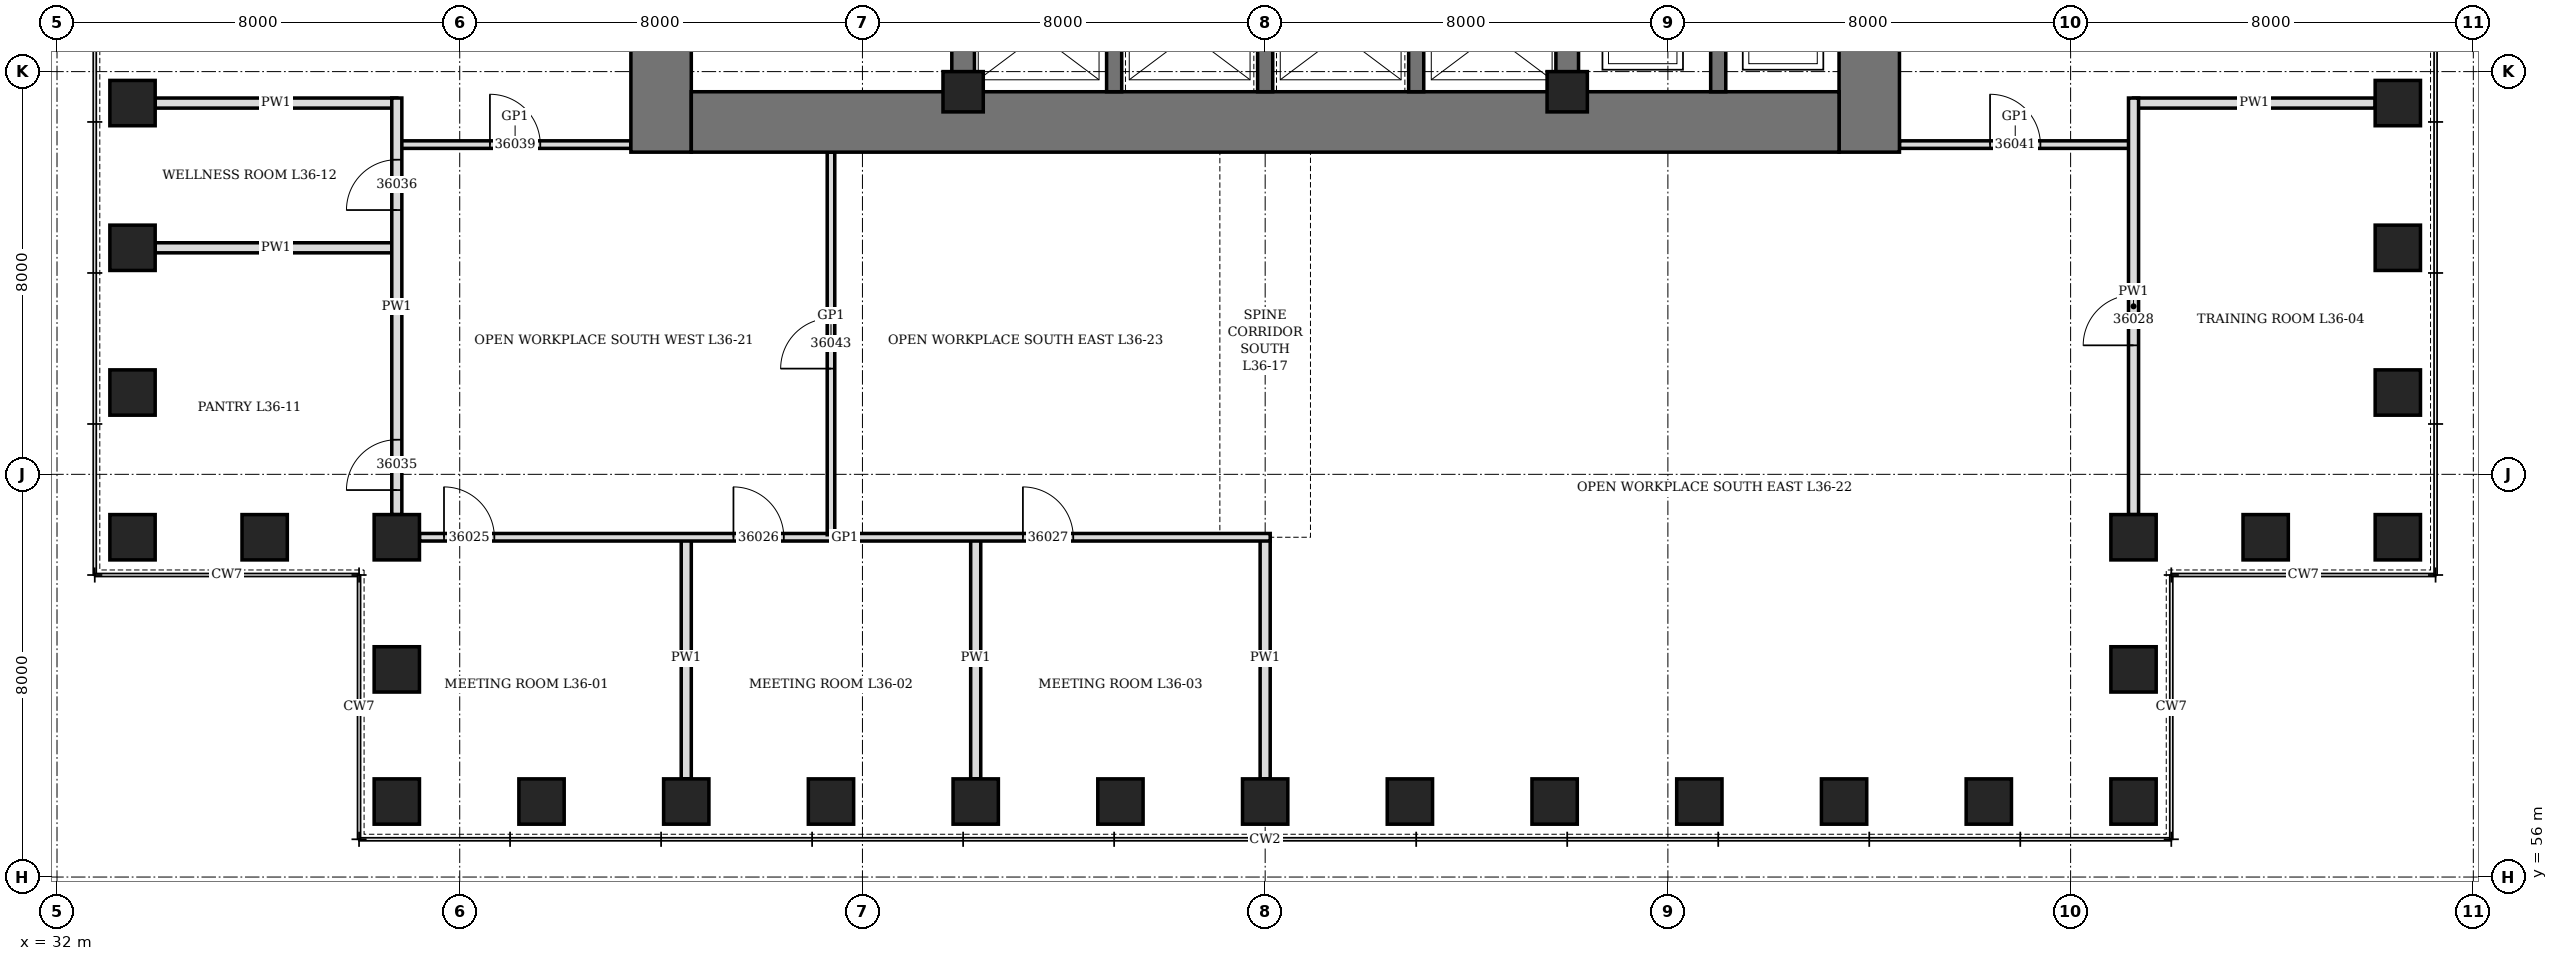
"""IFC4 building model, lengths in metres.
Left out: names, types, materials, properties, quantities, classifications, styles, units other than length and angle.
Written with IfcOpenShell. Run it as: python <this file> out.ifc"""

import sys

from ifc_helpers import new_model, si_unit, direction, frame, frame_2d, origin, origin_2d, place, context, subcontext, project, spatial, rectangle, hollow_rectangle, extrude, element, fill, save


model = new_model("IFC4")
c1 = context("Model", 3, precision=1e-05, world=origin(), true_north=direction((0.0, 1.0)))
c2 = subcontext(c1, "Body", "Model", "MODEL_VIEW")
j1 = project(units=[si_unit("LENGTHUNIT", "METRE"), si_unit("PLANEANGLEUNIT", "RADIAN")], contexts=[c1])
p1 = place(None, origin())
s1 = spatial("IfcSite", under=j1, at=p1, CompositionType="ELEMENT")
p2 = place(p1, origin())
s2 = spatial("IfcBuilding", under=s1, at=p2, CompositionType="ELEMENT")
p3 = place(p2, frame((0.0, 0.0, 162.7)))
s3 = spatial("IfcBuildingStorey", under=s2, at=p3, CompositionType="ELEMENT", Elevation=162.7)
for number, where, z_axis, x_axis in (
    (1, (38.75, 57.5, 0.0), (0.0, 0.0, 1.0), (1.0, 0.0, 0.0)),
    (2, (41.625, 57.5, 0.0), (0.0, 0.0, 1.0), (1.0, 0.0, 0.0)),
    (3, (44.5, 57.5, 0.0), (0.0, 0.0, 1.0), (1.0, 0.0, 0.0)),
    (4, (47.375, 57.5, 0.0), (0.0, 0.0, 1.0), (1.0, 0.0, 0.0)),
    (5, (50.25, 57.5, 0.0), (0.0, 0.0, 1.0), (1.0, 0.0, 0.0)),
    (6, (53.125, 57.5, 0.0), (0.0, 0.0, 1.0), (1.0, 0.0, 0.0)),
    (7, (56.0, 57.5, 0.0), (0.0, 0.0, 1.0), (1.0, 0.0, 0.0)),
    (8, (58.875, 57.5, 0.0), (0.0, 0.0, 1.0), (1.0, 0.0, 0.0)),
    (9, (61.75, 57.5, 0.0), (0.0, 0.0, 1.0), (1.0, 0.0, 0.0)),
    (10, (64.625, 57.5, 0.0), (0.0, 0.0, 1.0), (1.0, 0.0, 0.0)),
    (11, (67.5, 57.5, 0.0), (0.0, 0.0, 1.0), (1.0, 0.0, 0.0)),
    (12, (70.375, 57.5, 0.0), (0.0, 0.0, 1.0), (1.0, 0.0, 0.0)),
    (13, (73.25, 57.5, 0.0), (0.0, 0.0, 1.0), (0.0, 1.0, 0.0)),
    (14, (73.25, 60.125, 0.0), (0.0, 0.0, 1.0), (0.0, 1.0, 0.0)),
    (15, (73.25, 62.75, 0.0), (0.0, 0.0, 1.0), (1.0, 0.0, 0.0)),
    (16, (75.875, 62.75, 0.0), (0.0, 0.0, 1.0), (1.0, 0.0, 0.0)),
    (17, (78.5, 62.75, 0.0), (0.0, 0.0, 1.0), (0.0, 1.0, 0.0)),
    (18, (78.5, 65.625, 0.0), (0.0, 0.0, 1.0), (0.0, 1.0, 0.0)),
    (19, (78.5, 68.5, 0.0), (0.0, 0.0, 1.0), (0.0, 1.0, 0.0)),
    (20, (78.5, 71.375, 0.0), (0.0, 0.0, 1.0), (0.0, 1.0, 0.0)),
    (21, (33.5, 71.375, 0.0), (0.0, 0.0, 1.0), (0.0, 1.0, 0.0)),
    (22, (33.5, 68.5, 0.0), (0.0, 0.0, 1.0), (0.0, 1.0, 0.0)),
    (23, (33.5, 65.625, 0.0), (0.0, 0.0, 1.0), (0.0, 1.0, 0.0)),
    (24, (33.5, 62.75, 0.0), (0.0, 0.0, 1.0), (1.0, 0.0, 0.0)),
    (25, (36.125, 62.75, 0.0), (0.0, 0.0, 1.0), (1.0, 0.0, 0.0)),
    (26, (38.75, 62.75, 0.0), (0.0, 0.0, 1.0), (0.0, 1.0, 0.0)),
    (27, (38.75, 60.125, 0.0), (0.0, 0.0, 1.0), (0.0, 1.0, 0.0)),
):
    element("IfcColumn", number, at=place(p3, frame(where, z_axis=z_axis, x_axis=x_axis)), inside=s3, PredefinedType="COLUMN", context=c2, shape_type="SweptSolid", body=[
        extrude(hollow_rectangle(XDim=0.9, YDim=0.9, WallThickness=0.12, at=origin_2d()), origin(), (0.0, 0.0, 1.0), 4.2),
    ])
p4 = place(p3, frame((44.0, 70.4, 0.0), z_axis=(0.0, 0.0, 1.0), x_axis=(0.0, 1.0, 0.0)))
e28 = element("IfcWall", 28, at=p4, inside=s3, PredefinedType="SHEAR", context=c2, shape_type="SweptSolid", body=[
    extrude(rectangle(XDim=19.2, YDim=1.2, at=frame_2d((9.6, 0.0))), origin(), (0.0, 0.0, 1.0), 4.2),
])
p5 = place(p4, frame((8.6, 0.0, 0.0)))
e29 = element("IfcOpeningElement", 29, at=p5, cuts=e28, PredefinedType="OPENING", context=c2, shape_type="SweptSolid", body=[
    extrude(rectangle(XDim=2.0, YDim=2.4, at=frame_2d((1.0, 1.2))), frame((0.0, 0.61, 0.0), z_axis=(0.0, -1.0, 0.0), x_axis=(1.0, 0.0, 0.0)), (0.0, 0.0, 1.0), 1.22),
])
p6 = place(p3, frame((68.0, 70.4, 0.0), z_axis=(0.0, 0.0, 1.0), x_axis=(0.0, 1.0, 0.0)))
e30 = element("IfcWall", 30, at=p6, inside=s3, PredefinedType="SHEAR", context=c2, shape_type="SweptSolid", body=[
    extrude(rectangle(XDim=19.2, YDim=1.2, at=frame_2d((9.6, 0.0))), origin(), (0.0, 0.0, 1.0), 4.2),
])
p7 = place(p6, frame((8.6, 0.0, 0.0)))
e31 = element("IfcOpeningElement", 31, at=p7, cuts=e30, PredefinedType="OPENING", context=c2, shape_type="SweptSolid", body=[
    extrude(rectangle(XDim=2.0, YDim=2.4, at=frame_2d((1.0, 1.2))), frame((0.0, 0.61, 0.0), z_axis=(0.0, -1.0, 0.0), x_axis=(1.0, 0.0, 0.0)), (0.0, 0.0, 1.0), 1.22),
])
p8 = place(p3, frame((44.6, 71.0, 0.0), z_axis=(0.0, 0.0, 1.0), x_axis=(1.0, 0.0, 0.0)))
e32 = element("IfcWall", 32, at=p8, inside=s3, PredefinedType="SHEAR", context=c2, shape_type="SweptSolid", body=[
    extrude(rectangle(XDim=22.8, YDim=1.2, at=frame_2d((11.4, 0.0))), origin(), (0.0, 0.0, 1.0), 4.2),
])
p9 = place(p3, frame((50.0, 71.6, 0.0), z_axis=(0.0, 0.0, 1.0), x_axis=(0.0, 1.0, 0.0)))
e33 = element("IfcWall", 33, at=p9, inside=s3, PredefinedType="SHEAR", context=c2, shape_type="SweptSolid", body=[
    extrude(rectangle(XDim=16.8, YDim=0.45, at=frame_2d((8.4, 0.0))), origin(), (0.0, 0.0, 1.0), 4.2),
])
p10 = place(p9, frame((7.5, 0.0, 0.0)))
e34 = element("IfcOpeningElement", 34, at=p10, cuts=e33, PredefinedType="OPENING", context=c2, shape_type="SweptSolid", body=[
    extrude(rectangle(XDim=1.8, YDim=2.4, at=frame_2d((0.9, 1.2))), frame((0.0, 0.235, 0.0), z_axis=(0.0, -1.0, 0.0), x_axis=(1.0, 0.0, 0.0)), (0.0, 0.0, 1.0), 0.47),
])
p11 = place(p3, frame((62.0, 71.6, 0.0), z_axis=(0.0, 0.0, 1.0), x_axis=(0.0, 1.0, 0.0)))
e35 = element("IfcWall", 35, at=p11, inside=s3, PredefinedType="SHEAR", context=c2, shape_type="SweptSolid", body=[
    extrude(rectangle(XDim=16.8, YDim=0.45, at=frame_2d((8.4, 0.0))), origin(), (0.0, 0.0, 1.0), 4.2),
])
p12 = place(p11, frame((7.5, 0.0, 0.0)))
e36 = element("IfcOpeningElement", 36, at=p12, cuts=e35, PredefinedType="OPENING", context=c2, shape_type="SweptSolid", body=[
    extrude(rectangle(XDim=1.8, YDim=2.4, at=frame_2d((0.9, 1.2))), frame((0.0, 0.235, 0.0), z_axis=(0.0, -1.0, 0.0), x_axis=(1.0, 0.0, 0.0)), (0.0, 0.0, 1.0), 0.47),
])
for number, where, z_axis, x_axis in (
    (37, (53.0, 71.6, 0.0), (0.0, 0.0, 1.0), (0.0, 1.0, 0.0)),
    (38, (56.0, 71.6, 0.0), (0.0, 0.0, 1.0), (0.0, 1.0, 0.0)),
    (39, (59.0, 71.6, 0.0), (0.0, 0.0, 1.0), (0.0, 1.0, 0.0)),
):
    element("IfcWall", number, at=place(p3, frame(where, z_axis=z_axis, x_axis=x_axis)), inside=s3, PredefinedType="SHEAR", context=c2, shape_type="SweptSolid", body=[
        extrude(rectangle(XDim=2.25, YDim=0.3, at=frame_2d((1.125, 0.0))), origin(), (0.0, 0.0, 1.0), 4.2),
    ])
p13 = place(p3, frame((65.0, 71.6, 0.0), z_axis=(0.0, 0.0, 1.0), x_axis=(0.0, 1.0, 0.0)))
e40 = element("IfcWall", 40, at=p13, inside=s3, PredefinedType="SHEAR", context=c2, shape_type="SweptSolid", body=[
    extrude(rectangle(XDim=3.175, YDim=0.3, at=frame_2d((1.587, 0.0))), origin(), (0.0, 0.0, 1.0), 4.2),
])
for number, where, z_axis, x_axis in (
    (41, (50.0, 71.6, 0.0), (0.0, 0.0, 1.0), (1.0, 0.0, 0.0)),
    (42, (62.0, 71.6, 0.0), (0.0, 0.0, 1.0), (1.0, 0.0, 0.0)),
):
    element("IfcColumn", number, at=place(p3, frame(where, z_axis=z_axis, x_axis=x_axis)), inside=s3, PredefinedType="COLUMN", context=c2, shape_type="SweptSolid", body=[
        extrude(hollow_rectangle(XDim=0.8, YDim=0.8, WallThickness=0.1, at=origin_2d()), origin(), (0.0, 0.0, 1.0), 4.2),
    ])
p14 = place(p3, frame((44.5, 57.95, 0.0), z_axis=(0.0, 0.0, 1.0), x_axis=(0.0, 1.0, 0.0)))
e43 = element("IfcWall", 43, at=p14, inside=s3, PredefinedType="PARTITIONING", context=c2, shape_type="SweptSolid", body=[
    extrude(rectangle(XDim=4.8, YDim=0.2, at=frame_2d((2.4, 0.0))), origin(), (0.0, 0.0, 1.0), 2.74),
])
for number, where, z_axis, x_axis in (
    (44, (50.25, 57.95, 0.0), (0.0, 0.0, 1.0), (0.0, 1.0, 0.0)),
    (45, (56.0, 57.95, 0.0), (0.0, 0.0, 1.0), (0.0, 1.0, 0.0)),
):
    element("IfcWall", number, at=place(p3, frame(where, z_axis=z_axis, x_axis=x_axis)), inside=s3, PredefinedType="PARTITIONING", context=c2, shape_type="SweptSolid", body=[
        extrude(rectangle(XDim=4.8, YDim=0.2, at=frame_2d((2.4, 0.0))), origin(), (0.0, 0.0, 1.0), 3.278),
    ])
for number, where, z_axis, x_axis in (
    (46, (73.25, 71.375, 0.0), (0.0, 0.0, 1.0), (1.0, 0.0, 0.0)),
    (47, (33.95, 68.5, 0.0), (0.0, 0.0, 1.0), (1.0, 0.0, 0.0)),
    (48, (33.95, 71.375, 0.0), (0.0, 0.0, 1.0), (1.0, 0.0, 0.0)),
):
    element("IfcWall", number, at=place(p3, frame(where, z_axis=z_axis, x_axis=x_axis)), inside=s3, PredefinedType="PARTITIONING", context=c2, shape_type="SweptSolid", body=[
        extrude(rectangle(XDim=4.8, YDim=0.2, at=frame_2d((2.4, 0.0))), origin(), (0.0, 0.0, 1.0), 3.428),
    ])
p15 = place(p3, frame((39.2, 62.75, 0.0), z_axis=(0.0, 0.0, 1.0), x_axis=(1.0, 0.0, 0.0)))
e49 = element("IfcWall", 49, at=p15, inside=s3, PredefinedType="PARTITIONING", context=c2, shape_type="SweptSolid", body=[
    extrude(rectangle(XDim=16.9, YDim=0.15, at=frame_2d((8.45, 0.0))), origin(), (0.0, 0.0, 1.0), 4.04),
])
p16 = place(p15, frame((0.488, 0.0, 0.0)))
e50 = element("IfcOpeningElement", 50, at=p16, cuts=e49, PredefinedType="OPENING", context=c2, shape_type="SweptSolid", body=[
    extrude(rectangle(XDim=1.0, YDim=2.4, at=frame_2d((0.5, 1.2))), frame((0.0, 0.085, 0.0), z_axis=(0.0, -1.0, 0.0), x_axis=(1.0, 0.0, 0.0)), (0.0, 0.0, 1.0), 0.17),
])
p17 = place(p15, frame((6.238, 0.0, 0.0)))
e51 = element("IfcOpeningElement", 51, at=p17, cuts=e49, PredefinedType="OPENING", context=c2, shape_type="SweptSolid", body=[
    extrude(rectangle(XDim=1.0, YDim=2.4, at=frame_2d((0.5, 1.2))), frame((0.0, 0.085, 0.0), z_axis=(0.0, -1.0, 0.0), x_axis=(1.0, 0.0, 0.0)), (0.0, 0.0, 1.0), 0.17),
])
p18 = place(p15, frame((11.988, 0.0, 0.0)))
e52 = element("IfcOpeningElement", 52, at=p18, cuts=e49, PredefinedType="OPENING", context=c2, shape_type="SweptSolid", body=[
    extrude(rectangle(XDim=1.0, YDim=2.4, at=frame_2d((0.5, 1.2))), frame((0.0, 0.085, 0.0), z_axis=(0.0, -1.0, 0.0), x_axis=(1.0, 0.0, 0.0)), (0.0, 0.0, 1.0), 0.17),
])
p19 = place(p3, frame((38.8, 70.55, 0.0), z_axis=(0.0, 0.0, 1.0), x_axis=(1.0, 0.0, 0.0)))
e53 = element("IfcWall", 53, at=p19, inside=s3, PredefinedType="PARTITIONING", context=c2, shape_type="SweptSolid", body=[
    extrude(rectangle(XDim=4.6, YDim=0.15, at=frame_2d((2.3, 0.0))), origin(), (0.0, 0.0, 1.0), 4.04),
])
p20 = place(p19, frame((1.8, 0.0, 0.0)))
e54 = element("IfcOpeningElement", 54, at=p20, cuts=e53, PredefinedType="OPENING", context=c2, shape_type="SweptSolid", body=[
    extrude(rectangle(XDim=1.0, YDim=2.4, at=frame_2d((0.5, 1.2))), frame((0.0, 0.085, 0.0), z_axis=(0.0, -1.0, 0.0), x_axis=(1.0, 0.0, 0.0)), (0.0, 0.0, 1.0), 0.17),
])
p21 = place(p3, frame((68.6, 70.55, 0.0), z_axis=(0.0, 0.0, 1.0), x_axis=(1.0, 0.0, 0.0)))
e55 = element("IfcWall", 55, at=p21, inside=s3, PredefinedType="PARTITIONING", context=c2, shape_type="SweptSolid", body=[
    extrude(rectangle(XDim=4.6, YDim=0.15, at=frame_2d((2.3, 0.0))), origin(), (0.0, 0.0, 1.0), 4.04),
])
p22 = place(p21, frame((1.8, 0.0, 0.0)))
e56 = element("IfcOpeningElement", 56, at=p22, cuts=e55, PredefinedType="OPENING", context=c2, shape_type="SweptSolid", body=[
    extrude(rectangle(XDim=1.0, YDim=2.4, at=frame_2d((0.5, 1.2))), frame((0.0, 0.085, 0.0), z_axis=(0.0, -1.0, 0.0), x_axis=(1.0, 0.0, 0.0)), (0.0, 0.0, 1.0), 0.17),
])
p23 = place(p3, frame((38.75, 63.2, 0.0), z_axis=(0.0, 0.0, 1.0), x_axis=(0.0, 1.0, 0.0)))
e57 = element("IfcWall", 57, at=p23, inside=s3, PredefinedType="PARTITIONING", context=c2, shape_type="SweptSolid", body=[
    extrude(rectangle(XDim=8.275, YDim=0.2, at=frame_2d((4.138, 0.0))), origin(), (0.0, 0.0, 1.0), 4.04),
])
p24 = place(p23, frame((0.488, 0.0, 0.0)))
e58 = element("IfcOpeningElement", 58, at=p24, cuts=e57, PredefinedType="OPENING", context=c2, shape_type="SweptSolid", body=[
    extrude(rectangle(XDim=1.0, YDim=2.1, at=frame_2d((0.5, 1.05))), frame((0.0, 0.11, 0.0), z_axis=(0.0, -1.0, 0.0), x_axis=(1.0, 0.0, 0.0)), (0.0, 0.0, 1.0), 0.22),
])
p25 = place(p23, frame((6.05, 0.0, 0.0)))
e59 = element("IfcOpeningElement", 59, at=p25, cuts=e57, PredefinedType="OPENING", context=c2, shape_type="SweptSolid", body=[
    extrude(rectangle(XDim=1.0, YDim=2.1, at=frame_2d((0.5, 1.05))), frame((0.0, 0.11, 0.0), z_axis=(0.0, -1.0, 0.0), x_axis=(1.0, 0.0, 0.0)), (0.0, 0.0, 1.0), 0.22),
])
p26 = place(p3, frame((47.375, 62.8, 0.0), z_axis=(0.0, 0.0, 1.0), x_axis=(0.0, 1.0, 0.0)))
e60 = element("IfcWall", 60, at=p26, inside=s3, PredefinedType="PARTITIONING", context=c2, shape_type="SweptSolid", body=[
    extrude(rectangle(XDim=7.6, YDim=0.15, at=frame_2d((3.8, 0.0))), origin(), (0.0, 0.0, 1.0), 3.278),
])
p27 = place(p26, frame((3.3, 0.0, 0.0)))
e61 = element("IfcOpeningElement", 61, at=p27, cuts=e60, PredefinedType="OPENING", context=c2, shape_type="SweptSolid", body=[
    extrude(rectangle(XDim=1.0, YDim=2.4, at=frame_2d((0.5, 1.2))), frame((0.0, 0.085, 0.0), z_axis=(0.0, -1.0, 0.0), x_axis=(1.0, 0.0, 0.0)), (0.0, 0.0, 1.0), 0.17),
])
p28 = place(p3, frame((73.25, 63.2, 0.0), z_axis=(0.0, 0.0, 1.0), x_axis=(0.0, 1.0, 0.0)))
e62 = element("IfcWall", 62, at=p28, inside=s3, PredefinedType="PARTITIONING", context=c2, shape_type="SweptSolid", body=[
    extrude(rectangle(XDim=8.275, YDim=0.2, at=frame_2d((4.138, 0.0))), origin(), (0.0, 0.0, 1.0), 4.04),
])
p29 = place(p28, frame((3.363, 0.0, 0.0)))
e63 = element("IfcOpeningElement", 63, at=p29, cuts=e62, PredefinedType="OPENING", context=c2, shape_type="SweptSolid", body=[
    extrude(rectangle(XDim=1.0, YDim=2.1, at=frame_2d((0.5, 1.05))), frame((0.0, 0.11, 0.0), z_axis=(0.0, -1.0, 0.0), x_axis=(1.0, 0.0, 0.0)), (0.0, 0.0, 1.0), 0.22),
])
p30 = place(p16, origin())
e64 = element("IfcDoor", 64, at=p30, inside=s3, OperationType="SINGLE_SWING_RIGHT", PredefinedType="DOOR", context=c2, shape_type="SweptSolid", body=[
    extrude(rectangle(XDim=1.0, YDim=2.4, at=frame_2d((0.5, 1.2))), frame((0.0, 0.075, 0.0), z_axis=(0.0, -1.0, 0.0), x_axis=(1.0, 0.0, 0.0)), (0.0, 0.0, 1.0), 0.149),
])
fill(e50, e64)
p31 = place(p17, origin())
e65 = element("IfcDoor", 65, at=p31, inside=s3, OperationType="SINGLE_SWING_RIGHT", PredefinedType="DOOR", context=c2, shape_type="SweptSolid", body=[
    extrude(rectangle(XDim=1.0, YDim=2.4, at=frame_2d((0.5, 1.2))), frame((0.0, 0.075, 0.0), z_axis=(0.0, -1.0, 0.0), x_axis=(1.0, 0.0, 0.0)), (0.0, 0.0, 1.0), 0.149),
])
fill(e51, e65)
p32 = place(p18, origin())
e66 = element("IfcDoor", 66, at=p32, inside=s3, OperationType="SINGLE_SWING_RIGHT", PredefinedType="DOOR", context=c2, shape_type="SweptSolid", body=[
    extrude(rectangle(XDim=1.0, YDim=2.4, at=frame_2d((0.5, 1.2))), frame((0.0, 0.075, 0.0), z_axis=(0.0, -1.0, 0.0), x_axis=(1.0, 0.0, 0.0)), (0.0, 0.0, 1.0), 0.149),
])
fill(e52, e66)
p33 = place(p29, origin())
e67 = element("IfcDoor", 67, at=p33, inside=s3, OperationType="SINGLE_SWING_LEFT", PredefinedType="DOOR", context=c2, shape_type="SweptSolid", body=[
    extrude(rectangle(XDim=1.0, YDim=2.1, at=frame_2d((0.5, 1.05))), frame((0.0, 0.1, 0.0), z_axis=(0.0, -1.0, 0.0), x_axis=(1.0, 0.0, 0.0)), (0.0, 0.0, 1.0), 0.199),
])
fill(e63, e67)
p34 = place(p24, origin())
e68 = element("IfcDoor", 68, at=p34, inside=s3, OperationType="SINGLE_SWING_LEFT", PredefinedType="DOOR", context=c2, shape_type="SweptSolid", body=[
    extrude(rectangle(XDim=1.0, YDim=2.1, at=frame_2d((0.5, 1.05))), frame((0.0, 0.1, 0.0), z_axis=(0.0, -1.0, 0.0), x_axis=(1.0, 0.0, 0.0)), (0.0, 0.0, 1.0), 0.199),
])
fill(e58, e68)
p35 = place(p25, origin())
e69 = element("IfcDoor", 69, at=p35, inside=s3, OperationType="SINGLE_SWING_LEFT", PredefinedType="DOOR", context=c2, shape_type="SweptSolid", body=[
    extrude(rectangle(XDim=1.0, YDim=2.1, at=frame_2d((0.5, 1.05))), frame((0.0, 0.1, 0.0), z_axis=(0.0, -1.0, 0.0), x_axis=(1.0, 0.0, 0.0)), (0.0, 0.0, 1.0), 0.199),
])
fill(e59, e69)
p36 = place(p20, origin())
e70 = element("IfcDoor", 70, at=p36, inside=s3, OperationType="SINGLE_SWING_RIGHT", PredefinedType="DOOR", context=c2, shape_type="SweptSolid", body=[
    extrude(rectangle(XDim=1.0, YDim=2.4, at=frame_2d((0.5, 1.2))), frame((0.0, 0.075, 0.0), z_axis=(0.0, -1.0, 0.0), x_axis=(1.0, 0.0, 0.0)), (0.0, 0.0, 1.0), 0.149),
])
fill(e54, e70)
p37 = place(p22, origin())
e71 = element("IfcDoor", 71, at=p37, inside=s3, OperationType="SINGLE_SWING_RIGHT", PredefinedType="DOOR", context=c2, shape_type="SweptSolid", body=[
    extrude(rectangle(XDim=1.0, YDim=2.4, at=frame_2d((0.5, 1.2))), frame((0.0, 0.075, 0.0), z_axis=(0.0, -1.0, 0.0), x_axis=(1.0, 0.0, 0.0)), (0.0, 0.0, 1.0), 0.149),
])
fill(e56, e71)
p38 = place(p27, origin())
e72 = element("IfcDoor", 72, at=p38, inside=s3, OperationType="SINGLE_SWING_RIGHT", PredefinedType="DOOR", context=c2, shape_type="SweptSolid", body=[
    extrude(rectangle(XDim=1.0, YDim=2.4, at=frame_2d((0.5, 1.2))), frame((0.0, 0.075, 0.0), z_axis=(0.0, -1.0, 0.0), x_axis=(1.0, 0.0, 0.0)), (0.0, 0.0, 1.0), 0.149),
])
fill(e61, e72)
save(model, sys.argv[1])
